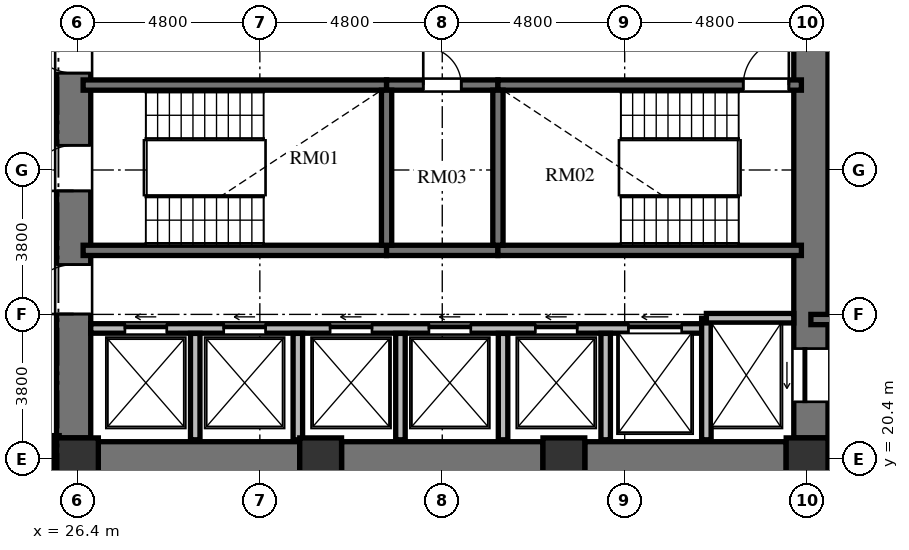
"""IFC4 building model, lengths in metres.
Left out: names, types, materials, properties, quantities, classifications, styles, units other than length and angle.
Written with IfcOpenShell. Run it as: python <this file> out.ifc"""

import sys

from ifc_helpers import new_model, si_unit, direction, frame, frame_2d, origin, origin_2d, place, context, subcontext, project, spatial, rectangle, extrude, element, fill, save


model = new_model("IFC4")
c1 = context("Model", 3, precision=1e-05, world=origin(), true_north=direction((0.0, 1.0)))
c2 = subcontext(c1, "Body", "Model", "MODEL_VIEW")
j1 = project(units=[si_unit("LENGTHUNIT", "METRE"), si_unit("PLANEANGLEUNIT", "RADIAN")], contexts=[c1])
p1 = place(None, origin())
s1 = spatial("IfcSite", under=j1, at=p1, CompositionType="ELEMENT")
p2 = place(p1, origin())
s2 = spatial("IfcBuilding", under=s1, at=p2, CompositionType="ELEMENT")
p3 = place(p2, frame((0.0, 0.0, 68.976)))
s3 = spatial("IfcBuildingStorey", under=s2, at=p3, CompositionType="ELEMENT", Elevation=68.976)
for number, where, z_axis, x_axis in (
    (1, (26.4, 20.4, 0.0), (0.0, 0.0, 1.0), (1.0, 0.0, 0.0)),
    (2, (32.8, 20.4, 0.0), (0.0, 0.0, 1.0), (1.0, 0.0, 0.0)),
    (3, (39.2, 20.4, 0.0), (0.0, 0.0, 1.0), (1.0, 0.0, 0.0)),
    (4, (45.6, 20.4, 0.0), (0.0, 0.0, 1.0), (1.0, 0.0, 0.0)),
):
    element("IfcColumn", number, at=place(p3, frame(where, z_axis=z_axis, x_axis=x_axis)), inside=s3, PredefinedType="COLUMN", context=c2, shape_type="SweptSolid", body=[
        extrude(rectangle(XDim=1.1, YDim=1.1, at=origin_2d()), origin(), (0.0, 0.0, 1.0), 3.648),
    ])
p4 = place(p3, frame((26.3, 20.95, 0.0), z_axis=(0.0, 0.0, 1.0), x_axis=(0.0, 1.0, 0.0)))
e5 = element("IfcWall", 5, at=p4, inside=s3, PredefinedType="SHEAR", context=c2, shape_type="SweptSolid", body=[
    extrude(rectangle(XDim=14.1, YDim=0.9, at=frame_2d((7.05, 0.0))), origin(), (0.0, 0.0, 1.0), 3.648),
])
p5 = place(p4, frame((6.5, 0.0, 0.0)))
e6 = element("IfcOpeningElement", 6, at=p5, cuts=e5, PredefinedType="OPENING", context=c2, shape_type="SweptSolid", body=[
    extrude(rectangle(XDim=1.2, YDim=2.15, at=frame_2d((0.6, 1.075))), frame((0.0, 0.46, 0.0), z_axis=(0.0, -1.0, 0.0), x_axis=(1.0, 0.0, 0.0)), (0.0, 0.0, 1.0), 0.92),
])
p6 = place(p4, frame((9.6, 0.0, 0.0)))
e7 = element("IfcOpeningElement", 7, at=p6, cuts=e5, PredefinedType="OPENING", context=c2, shape_type="SweptSolid", body=[
    extrude(rectangle(XDim=1.3, YDim=2.2, at=frame_2d((0.65, 1.1))), frame((0.0, 0.46, 0.0), z_axis=(0.0, -1.0, 0.0), x_axis=(1.0, 0.0, 0.0)), (0.0, 0.0, 1.0), 0.92),
])
p7 = place(p4, frame((3.26, 0.0, 0.0)))
e8 = element("IfcOpeningElement", 8, at=p7, cuts=e5, PredefinedType="OPENING", context=c2, shape_type="SweptSolid", body=[
    extrude(rectangle(XDim=1.3, YDim=2.2, at=frame_2d((0.65, 1.1))), frame((0.0, 0.46, 0.0), z_axis=(0.0, -1.0, 0.0), x_axis=(1.0, 0.0, 0.0)), (0.0, 0.0, 1.0), 0.92),
])
p8 = place(p3, frame((45.7, 20.95, 0.0), z_axis=(0.0, 0.0, 1.0), x_axis=(0.0, 1.0, 0.0)))
e9 = element("IfcWall", 9, at=p8, inside=s3, PredefinedType="SHEAR", context=c2, shape_type="SweptSolid", body=[
    extrude(rectangle(XDim=14.1, YDim=0.9, at=frame_2d((7.05, 0.0))), origin(), (0.0, 0.0, 1.0), 3.648),
])
p9 = place(p8, frame((11.75, 0.0, 0.0)))
e10 = element("IfcOpeningElement", 10, at=p9, cuts=e9, PredefinedType="OPENING", context=c2, shape_type="SweptSolid", body=[
    extrude(rectangle(XDim=1.4, YDim=2.3, at=frame_2d((0.7, 1.15))), frame((0.0, 0.46, 0.0), z_axis=(0.0, -1.0, 0.0), x_axis=(1.0, 0.0, 0.0)), (0.0, 0.0, 1.0), 0.92),
])
p10 = place(p8, frame((0.95, 0.0, 0.0)))
e11 = element("IfcOpeningElement", 11, at=p10, cuts=e9, PredefinedType="OPENING", context=c2, shape_type="SweptSolid", body=[
    extrude(rectangle(XDim=1.4, YDim=2.3, at=frame_2d((0.7, 1.15))), frame((0.0, 0.46, 0.0), z_axis=(0.0, -1.0, 0.0), x_axis=(1.0, 0.0, 0.0)), (0.0, 0.0, 1.0), 0.92),
])
p11 = place(p3, frame((26.95, 20.4, 0.0), z_axis=(0.0, 0.0, 1.0), x_axis=(1.0, 0.0, 0.0)))
e12 = element("IfcWall", 12, at=p11, inside=s3, PredefinedType="SHEAR", context=c2, shape_type="SweptSolid", body=[
    extrude(rectangle(XDim=5.3, YDim=0.9, at=frame_2d((2.65, 0.0))), origin(), (0.0, 0.0, 1.0), 3.648),
])
p12 = place(p3, frame((33.35, 20.4, 0.0), z_axis=(0.0, 0.0, 1.0), x_axis=(1.0, 0.0, 0.0)))
e13 = element("IfcWall", 13, at=p12, inside=s3, PredefinedType="SHEAR", context=c2, shape_type="SweptSolid", body=[
    extrude(rectangle(XDim=5.3, YDim=0.9, at=frame_2d((2.65, 0.0))), origin(), (0.0, 0.0, 1.0), 3.648),
])
p13 = place(p3, frame((39.75, 20.4, 0.0), z_axis=(0.0, 0.0, 1.0), x_axis=(1.0, 0.0, 0.0)))
e14 = element("IfcWall", 14, at=p13, inside=s3, PredefinedType="SHEAR", context=c2, shape_type="SweptSolid", body=[
    extrude(rectangle(XDim=5.3, YDim=0.9, at=frame_2d((2.65, 0.0))), origin(), (0.0, 0.0, 1.0), 3.648),
])
p14 = place(p3, frame((26.55, 30.235, 0.0), z_axis=(0.0, 0.0, 1.0), x_axis=(1.0, 0.0, 0.0)))
e15 = element("IfcWall", 15, at=p14, inside=s3, PredefinedType="SHEAR", context=c2, shape_type="SweptSolid", body=[
    extrude(rectangle(XDim=7.985, YDim=0.27, at=frame_2d((3.992, 0.0))), origin(), (0.0, 0.0, 1.0), 3.648),
])
p15 = place(p3, frame((34.535, 30.235, 0.0), z_axis=(0.0, 0.0, 1.0), x_axis=(1.0, 0.0, 0.0)))
e16 = element("IfcWall", 16, at=p15, inside=s3, PredefinedType="SHEAR", context=c2, shape_type="SweptSolid", body=[
    extrude(rectangle(XDim=2.93, YDim=0.27, at=frame_2d((1.465, 0.0))), origin(), (0.0, 0.0, 1.0), 3.648),
])
p16 = place(p15, frame((0.965, 0.0, 0.0)))
e17 = element("IfcOpeningElement", 17, at=p16, cuts=e16, PredefinedType="OPENING", context=c2, shape_type="SweptSolid", body=[
    extrude(rectangle(XDim=1.0, YDim=2.1, at=frame_2d((0.5, 1.05))), frame((0.0, 0.145, 0.0), z_axis=(0.0, -1.0, 0.0), x_axis=(1.0, 0.0, 0.0)), (0.0, 0.0, 1.0), 0.29),
])
p17 = place(p3, frame((37.465, 30.235, 0.0), z_axis=(0.0, 0.0, 1.0), x_axis=(1.0, 0.0, 0.0)))
e18 = element("IfcWall", 18, at=p17, inside=s3, PredefinedType="SHEAR", context=c2, shape_type="SweptSolid", body=[
    extrude(rectangle(XDim=7.985, YDim=0.27, at=frame_2d((3.992, 0.0))), origin(), (0.0, 0.0, 1.0), 3.648),
])
p18 = place(p17, frame((6.455, 0.0, 0.0)))
e19 = element("IfcOpeningElement", 19, at=p18, cuts=e18, PredefinedType="OPENING", context=c2, shape_type="SweptSolid", body=[
    extrude(rectangle(XDim=1.2, YDim=2.15, at=frame_2d((0.6, 1.075))), frame((0.0, 0.145, 0.0), z_axis=(0.0, -1.0, 0.0), x_axis=(1.0, 0.0, 0.0)), (0.0, 0.0, 1.0), 0.29),
])
p19 = place(p3, frame((26.55, 25.885, 0.0), z_axis=(0.0, 0.0, 1.0), x_axis=(1.0, 0.0, 0.0)))
e20 = element("IfcWall", 20, at=p19, inside=s3, PredefinedType="SHEAR", context=c2, shape_type="SweptSolid", body=[
    extrude(rectangle(XDim=7.985, YDim=0.27, at=frame_2d((3.992, 0.0))), origin(), (0.0, 0.0, 1.0), 3.648),
])
p20 = place(p3, frame((34.535, 25.885, 0.0), z_axis=(0.0, 0.0, 1.0), x_axis=(1.0, 0.0, 0.0)))
e21 = element("IfcWall", 21, at=p20, inside=s3, PredefinedType="SHEAR", context=c2, shape_type="SweptSolid", body=[
    extrude(rectangle(XDim=2.93, YDim=0.27, at=frame_2d((1.465, 0.0))), origin(), (0.0, 0.0, 1.0), 3.648),
])
p21 = place(p3, frame((37.465, 25.885, 0.0), z_axis=(0.0, 0.0, 1.0), x_axis=(1.0, 0.0, 0.0)))
e22 = element("IfcWall", 22, at=p21, inside=s3, PredefinedType="SHEAR", context=c2, shape_type="SweptSolid", body=[
    extrude(rectangle(XDim=7.985, YDim=0.27, at=frame_2d((3.992, 0.0))), origin(), (0.0, 0.0, 1.0), 3.648),
])
for number, where, z_axis, x_axis in (
    (23, (34.535, 26.02, 0.0), (0.0, 0.0, 1.0), (0.0, 1.0, 0.0)),
    (24, (37.465, 26.02, 0.0), (0.0, 0.0, 1.0), (0.0, 1.0, 0.0)),
):
    element("IfcWall", number, at=place(p3, frame(where, z_axis=z_axis, x_axis=x_axis)), inside=s3, PredefinedType="SHEAR", context=c2, shape_type="SweptSolid", body=[
        extrude(rectangle(XDim=4.08, YDim=0.27, at=frame_2d((2.04, 0.0))), origin(), (0.0, 0.0, 1.0), 3.648),
    ])
p22 = place(p3, frame((26.75, 23.83, 0.0), z_axis=(0.0, 0.0, 1.0), x_axis=(1.0, 0.0, 0.0)))
e25 = element("IfcWall", 25, at=p22, inside=s3, PredefinedType="SOLIDWALL", context=c2, shape_type="SweptSolid", body=[
    extrude(rectangle(XDim=16.2, YDim=0.25, at=frame_2d((8.1, 0.0))), origin(), (0.0, 0.0, 1.0), 3.428),
])
p23 = place(p22, frame((0.9, 0.0, 0.0)))
e26 = element("IfcOpeningElement", 26, at=p23, cuts=e25, PredefinedType="OPENING", context=c2, shape_type="SweptSolid", body=[
    extrude(rectangle(XDim=1.1, YDim=2.2, at=frame_2d((0.55, 1.1))), frame((0.0, 0.135, 0.0), z_axis=(0.0, -1.0, 0.0), x_axis=(1.0, 0.0, 0.0)), (0.0, 0.0, 1.0), 0.27),
])
p24 = place(p22, frame((3.5, 0.0, 0.0)))
e27 = element("IfcOpeningElement", 27, at=p24, cuts=e25, PredefinedType="OPENING", context=c2, shape_type="SweptSolid", body=[
    extrude(rectangle(XDim=1.1, YDim=2.2, at=frame_2d((0.55, 1.1))), frame((0.0, 0.135, 0.0), z_axis=(0.0, -1.0, 0.0), x_axis=(1.0, 0.0, 0.0)), (0.0, 0.0, 1.0), 0.27),
])
p25 = place(p22, frame((6.3, 0.0, 0.0)))
e28 = element("IfcOpeningElement", 28, at=p25, cuts=e25, PredefinedType="OPENING", context=c2, shape_type="SweptSolid", body=[
    extrude(rectangle(XDim=1.1, YDim=2.2, at=frame_2d((0.55, 1.1))), frame((0.0, 0.135, 0.0), z_axis=(0.0, -1.0, 0.0), x_axis=(1.0, 0.0, 0.0)), (0.0, 0.0, 1.0), 0.27),
])
p26 = place(p22, frame((8.9, 0.0, 0.0)))
e29 = element("IfcOpeningElement", 29, at=p26, cuts=e25, PredefinedType="OPENING", context=c2, shape_type="SweptSolid", body=[
    extrude(rectangle(XDim=1.1, YDim=2.2, at=frame_2d((0.55, 1.1))), frame((0.0, 0.135, 0.0), z_axis=(0.0, -1.0, 0.0), x_axis=(1.0, 0.0, 0.0)), (0.0, 0.0, 1.0), 0.27),
])
p27 = place(p22, frame((11.7, 0.0, 0.0)))
e30 = element("IfcOpeningElement", 30, at=p27, cuts=e25, PredefinedType="OPENING", context=c2, shape_type="SweptSolid", body=[
    extrude(rectangle(XDim=1.1, YDim=2.2, at=frame_2d((0.55, 1.1))), frame((0.0, 0.135, 0.0), z_axis=(0.0, -1.0, 0.0), x_axis=(1.0, 0.0, 0.0)), (0.0, 0.0, 1.0), 0.27),
])
p28 = place(p22, frame((14.15, 0.0, 0.0)))
e31 = element("IfcOpeningElement", 31, at=p28, cuts=e25, PredefinedType="OPENING", context=c2, shape_type="SweptSolid", body=[
    extrude(rectangle(XDim=1.4, YDim=2.3, at=frame_2d((0.7, 1.15))), frame((0.0, 0.135, 0.0), z_axis=(0.0, -1.0, 0.0), x_axis=(1.0, 0.0, 0.0)), (0.0, 0.0, 1.0), 0.27),
])
p29 = place(p3, frame((42.95, 20.9, 0.0), z_axis=(0.0, 0.0, 1.0), x_axis=(0.0, 1.0, 0.0)))
e32 = element("IfcWall", 32, at=p29, inside=s3, PredefinedType="SOLIDWALL", context=c2, shape_type="SweptSolid", body=[
    extrude(rectangle(XDim=3.2, YDim=0.25, at=frame_2d((1.6, 0.0))), origin(), (0.0, 0.0, 1.0), 3.428),
])
p30 = place(p3, frame((42.95, 24.1, 0.0), z_axis=(0.0, 0.0, 1.0), x_axis=(1.0, 0.0, 0.0)))
e33 = element("IfcWall", 33, at=p30, inside=s3, PredefinedType="SOLIDWALL", context=c2, shape_type="SweptSolid", body=[
    extrude(rectangle(XDim=2.3, YDim=0.25, at=frame_2d((1.15, 0.0))), origin(), (0.0, 0.0, 1.0), 3.428),
])
for number, where, z_axis, x_axis in (
    (34, (29.5, 20.9, 0.0), (0.0, 0.0, 1.0), (0.0, 1.0, 0.0)),
    (35, (32.2, 20.9, 0.0), (0.0, 0.0, 1.0), (0.0, 1.0, 0.0)),
    (36, (34.9, 20.9, 0.0), (0.0, 0.0, 1.0), (0.0, 1.0, 0.0)),
    (37, (37.6, 20.9, 0.0), (0.0, 0.0, 1.0), (0.0, 1.0, 0.0)),
    (38, (40.3, 20.9, 0.0), (0.0, 0.0, 1.0), (0.0, 1.0, 0.0)),
):
    element("IfcWall", number, at=place(p3, frame(where, z_axis=z_axis, x_axis=x_axis)), inside=s3, PredefinedType="SOLIDWALL", context=c2, shape_type="SweptSolid", body=[
        extrude(rectangle(XDim=2.8, YDim=0.25, at=frame_2d((1.4, 0.0))), origin(), (0.0, 0.0, 1.0), 3.428),
    ])
p31 = place(p3, frame((45.7, 24.065, 0.0), z_axis=(0.0, 0.0, 1.0), x_axis=(1.0, 0.0, 0.0)))
e39 = element("IfcWall", 39, at=p31, inside=s3, PredefinedType="SHEAR", context=c2, shape_type="SweptSolid", body=[
    extrude(rectangle(XDim=4.715, YDim=0.27, at=frame_2d((2.357, 0.0))), origin(), (0.0, 0.0, 1.0), 3.648),
])
p32 = place(p3, frame((45.7, 20.02, 0.0), z_axis=(0.0, 0.0, 1.0), x_axis=(1.0, 0.0, 0.0)))
e40 = element("IfcWall", 40, at=p32, inside=s3, PredefinedType="SOLIDWALL", context=c2, shape_type="SweptSolid", body=[
    extrude(rectangle(XDim=4.715, YDim=0.25, at=frame_2d((2.357, 0.0))), origin(), (0.0, 0.0, 1.0), 2.813),
])
p33 = place(p3, frame((25.83, 21.01, 0.0), z_axis=(0.0, 0.0, 1.0), x_axis=(0.0, -1.0, 0.0)))
e41 = element("IfcWall", 41, at=p33, inside=s3, PredefinedType="PARTITIONING", context=c2, shape_type="SweptSolid", body=[
    extrude(rectangle(XDim=1.22, YDim=0.18, at=frame_2d((0.61, 0.0))), origin(), (0.0, 0.0, 1.0), 3.428),
])
p34 = place(p5, origin())
e42 = element("IfcDoor", 42, at=p34, inside=s3, OperationType="SINGLE_SWING_LEFT", PredefinedType="DOOR", context=c2, shape_type="SweptSolid", body=[
    extrude(rectangle(XDim=1.2, YDim=2.15, at=frame_2d((0.6, 1.075))), frame((0.0, 0.025, 0.0), z_axis=(0.0, -1.0, 0.0), x_axis=(1.0, 0.0, 0.0)), (0.0, 0.0, 1.0), 0.05),
])
fill(e6, e42)
p35 = place(p18, origin())
e43 = element("IfcDoor", 43, at=p35, inside=s3, OperationType="SINGLE_SWING_RIGHT", PredefinedType="DOOR", context=c2, shape_type="SweptSolid", body=[
    extrude(rectangle(XDim=1.2, YDim=2.15, at=frame_2d((0.6, 1.075))), frame((0.0, 0.025, 0.0), z_axis=(0.0, -1.0, 0.0), x_axis=(1.0, 0.0, 0.0)), (0.0, 0.0, 1.0), 0.05),
])
fill(e19, e43)
p36 = place(p16, origin())
e44 = element("IfcDoor", 44, at=p36, inside=s3, OperationType="SINGLE_SWING_LEFT", PredefinedType="DOOR", context=c2, shape_type="SweptSolid", body=[
    extrude(rectangle(XDim=1.0, YDim=2.1, at=frame_2d((0.5, 1.05))), frame((0.0, 0.025, 0.0), z_axis=(0.0, -1.0, 0.0), x_axis=(1.0, 0.0, 0.0)), (0.0, 0.0, 1.0), 0.05),
])
fill(e17, e44)
p37 = place(p6, origin())
e45 = element("IfcDoor", 45, at=p37, inside=s3, OperationType="SINGLE_SWING_RIGHT", PredefinedType="DOOR", context=c2, shape_type="SweptSolid", body=[
    extrude(rectangle(XDim=1.3, YDim=2.2, at=frame_2d((0.65, 1.1))), frame((0.0, 0.025, 0.0), z_axis=(0.0, -1.0, 0.0), x_axis=(1.0, 0.0, 0.0)), (0.0, 0.0, 1.0), 0.05),
])
fill(e7, e45)
p38 = place(p7, origin())
e46 = element("IfcDoor", 46, at=p38, inside=s3, OperationType="SINGLE_SWING_LEFT", PredefinedType="DOOR", context=c2, shape_type="SweptSolid", body=[
    extrude(rectangle(XDim=1.3, YDim=2.2, at=frame_2d((0.65, 1.1))), frame((0.0, 0.025, 0.0), z_axis=(0.0, -1.0, 0.0), x_axis=(1.0, 0.0, 0.0)), (0.0, 0.0, 1.0), 0.05),
])
fill(e8, e46)
p39 = place(p23, origin())
e47 = element("IfcDoor", 47, at=p39, inside=s3, OperationType="SLIDING_TO_LEFT", PredefinedType="DOOR", context=c2, shape_type="SweptSolid", body=[
    extrude(rectangle(XDim=1.1, YDim=2.2, at=frame_2d((0.55, 1.1))), frame((0.0, 0.025, 0.0), z_axis=(0.0, -1.0, 0.0), x_axis=(1.0, 0.0, 0.0)), (0.0, 0.0, 1.0), 0.05),
])
fill(e26, e47)
p40 = place(p24, origin())
e48 = element("IfcDoor", 48, at=p40, inside=s3, OperationType="SLIDING_TO_LEFT", PredefinedType="DOOR", context=c2, shape_type="SweptSolid", body=[
    extrude(rectangle(XDim=1.1, YDim=2.2, at=frame_2d((0.55, 1.1))), frame((0.0, 0.025, 0.0), z_axis=(0.0, -1.0, 0.0), x_axis=(1.0, 0.0, 0.0)), (0.0, 0.0, 1.0), 0.05),
])
fill(e27, e48)
p41 = place(p25, origin())
e49 = element("IfcDoor", 49, at=p41, inside=s3, OperationType="SLIDING_TO_LEFT", PredefinedType="DOOR", context=c2, shape_type="SweptSolid", body=[
    extrude(rectangle(XDim=1.1, YDim=2.2, at=frame_2d((0.55, 1.1))), frame((0.0, 0.025, 0.0), z_axis=(0.0, -1.0, 0.0), x_axis=(1.0, 0.0, 0.0)), (0.0, 0.0, 1.0), 0.05),
])
fill(e28, e49)
p42 = place(p26, origin())
e50 = element("IfcDoor", 50, at=p42, inside=s3, OperationType="SLIDING_TO_LEFT", PredefinedType="DOOR", context=c2, shape_type="SweptSolid", body=[
    extrude(rectangle(XDim=1.1, YDim=2.2, at=frame_2d((0.55, 1.1))), frame((0.0, 0.025, 0.0), z_axis=(0.0, -1.0, 0.0), x_axis=(1.0, 0.0, 0.0)), (0.0, 0.0, 1.0), 0.05),
])
fill(e29, e50)
p43 = place(p27, origin())
e51 = element("IfcDoor", 51, at=p43, inside=s3, OperationType="SLIDING_TO_LEFT", PredefinedType="DOOR", context=c2, shape_type="SweptSolid", body=[
    extrude(rectangle(XDim=1.1, YDim=2.2, at=frame_2d((0.55, 1.1))), frame((0.0, 0.025, 0.0), z_axis=(0.0, -1.0, 0.0), x_axis=(1.0, 0.0, 0.0)), (0.0, 0.0, 1.0), 0.05),
])
fill(e30, e51)
p44 = place(p10, origin())
e52 = element("IfcDoor", 52, at=p44, inside=s3, OperationType="SLIDING_TO_LEFT", PredefinedType="DOOR", context=c2, shape_type="SweptSolid", body=[
    extrude(rectangle(XDim=1.4, YDim=2.3, at=frame_2d((0.7, 1.15))), frame((0.0, 0.025, 0.0), z_axis=(0.0, -1.0, 0.0), x_axis=(1.0, 0.0, 0.0)), (0.0, 0.0, 1.0), 0.05),
])
fill(e11, e52)
p45 = place(p28, origin())
e53 = element("IfcDoor", 53, at=p45, inside=s3, OperationType="SLIDING_TO_LEFT", PredefinedType="DOOR", context=c2, shape_type="SweptSolid", body=[
    extrude(rectangle(XDim=1.4, YDim=2.3, at=frame_2d((0.7, 1.15))), frame((0.0, 0.025, 0.0), z_axis=(0.0, -1.0, 0.0), x_axis=(1.0, 0.0, 0.0)), (0.0, 0.0, 1.0), 0.05),
])
fill(e31, e53)
save(model, sys.argv[1])
